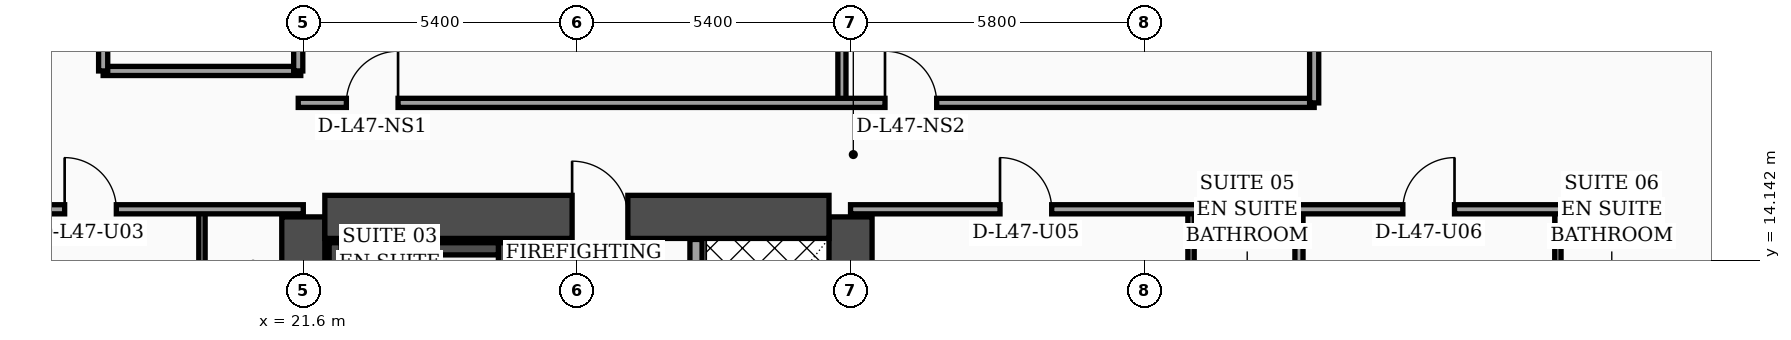
"""IFC4 building model, lengths in metres.
Left out: names, types, materials, properties, quantities, classifications, styles, units other than length and angle.
Written with IfcOpenShell. Run it as: python <this file> out.ifc"""

import sys

from ifc_helpers import new_model, si_unit, direction, frame, frame_2d, origin, place, context, subcontext, project, spatial, rectangle, extrude, element, fill, save


model = new_model("IFC4")
c1 = context("Model", 3, precision=1e-05, world=origin(), true_north=direction((0.0, 1.0)))
c2 = subcontext(c1, "Body", "Model", "MODEL_VIEW")
j1 = project(units=[si_unit("LENGTHUNIT", "METRE"), si_unit("PLANEANGLEUNIT", "RADIAN")], contexts=[c1])
p1 = place(None, origin())
s1 = spatial("IfcSite", under=j1, at=p1, CompositionType="ELEMENT")
p2 = place(p1, origin())
s2 = spatial("IfcBuilding", under=s1, at=p2, CompositionType="ELEMENT")
p3 = place(p2, frame((0.0, 0.0, 191.3)))
s3 = spatial("IfcBuildingStorey", under=s2, at=p3, CompositionType="ELEMENT", Elevation=191.3)
for number, where, z_axis, x_axis in (
    (1, (21.6, 4.6, 0.0), (0.0, 0.0, 1.0), (0.0, 1.0, 0.0)),
    (2, (32.4, 4.6, 0.0), (0.0, 0.0, 1.0), (0.0, 1.0, 0.0)),
):
    element("IfcWall", number, at=place(p3, frame(where, z_axis=z_axis, x_axis=x_axis)), inside=s3, PredefinedType="SHEAR", context=c2, shape_type="SweptSolid", body=[
        extrude(rectangle(XDim=10.4, YDim=0.85, at=frame_2d((5.2, 0.0))), origin(), (0.0, 0.0, 1.0), 3.56),
    ])
p4 = place(p3, frame((22.025, 15.0, 0.0), z_axis=(0.0, 0.0, 1.0), x_axis=(1.0, 0.0, 0.0)))
e3 = element("IfcWall", 3, at=p4, inside=s3, PredefinedType="SHEAR", context=c2, shape_type="SweptSolid", body=[
    extrude(rectangle(XDim=9.95, YDim=0.85, at=frame_2d((4.975, 0.0))), origin(), (0.0, 0.0, 1.0), 3.56),
])
p5 = place(p4, frame((4.88, 0.0, 0.0)))
e4 = element("IfcOpeningElement", 4, at=p5, cuts=e3, PredefinedType="OPENING", context=c2, shape_type="SweptSolid", body=[
    extrude(rectangle(XDim=1.1, YDim=2.2, at=frame_2d((0.55, 1.1))), frame((0.0, 0.435, 0.0), z_axis=(0.0, -1.0, 0.0), x_axis=(1.0, 0.0, 0.0)), (0.0, 0.0, 1.0), 0.87),
])
p6 = place(p3, frame((22.23, 5.025, 0.0), z_axis=(0.0, 0.0, 1.0), x_axis=(0.0, 1.0, 0.0)))
e5 = element("IfcWall", 5, at=p6, inside=s3, PredefinedType="SOLIDWALL", context=c2, shape_type="SweptSolid", body=[
    extrude(rectangle(XDim=9.465, YDim=0.24, at=frame_2d((4.732, 0.0))), origin(), (0.0, 0.0, 1.0), 3.56),
])
p7 = place(p3, frame((25.57, 5.025, 0.0), z_axis=(0.0, 0.0, 1.0), x_axis=(0.0, 1.0, 0.0)))
e6 = element("IfcWall", 6, at=p7, inside=s3, PredefinedType="SOLIDWALL", context=c2, shape_type="SweptSolid", body=[
    extrude(rectangle(XDim=9.465, YDim=0.24, at=frame_2d((4.732, 0.0))), origin(), (0.0, 0.0, 1.0), 3.56),
])
p8 = place(p7, frame((0.35, 0.0, 0.0)))
e7 = element("IfcOpeningElement", 7, at=p8, cuts=e6, PredefinedType="OPENING", context=c2, shape_type="SweptSolid", body=[
    extrude(rectangle(XDim=1.15, YDim=2.2, at=frame_2d((0.575, 1.1))), frame((0.0, 0.13, 0.0), z_axis=(0.0, -1.0, 0.0), x_axis=(1.0, 0.0, 0.0)), (0.0, 0.0, 1.0), 0.26),
])
p9 = place(p3, frame((22.35, 14.37, 0.0), z_axis=(0.0, 0.0, 1.0), x_axis=(1.0, 0.0, 0.0)))
e8 = element("IfcWall", 8, at=p9, inside=s3, PredefinedType="SOLIDWALL", context=c2, shape_type="SweptSolid", body=[
    extrude(rectangle(XDim=3.1, YDim=0.24, at=frame_2d((1.55, 0.0))), origin(), (0.0, 0.0, 1.0), 3.56),
])
p10 = place(p3, frame((55.03, 5.505, 0.0), z_axis=(0.0, 0.0, 1.0), x_axis=(-0.300509063924, 0.953778958931, 0.0)))
e9 = element("IfcWall", 9, at=p10, inside=s3, PredefinedType="SOLIDWALL", context=c2, shape_type="SweptSolid", body=[
    extrude(rectangle(XDim=30.814, YDim=0.32, at=frame_2d((15.407, 0.0))), origin(), (0.0, 0.0, 1.0), 3.56),
])
p11 = place(p10, frame((8.9, 0.0, 0.0)))
e10 = element("IfcOpeningElement", 10, at=p11, cuts=e9, PredefinedType="OPENING", context=c2, shape_type="SweptSolid", body=[
    extrude(rectangle(XDim=1.4, YDim=2.25, at=frame_2d((0.7, 1.125))), frame((0.0, 0.17, 0.0), z_axis=(0.0, -1.0, 0.0), x_axis=(1.0, 0.0, 0.0)), (0.0, 0.0, 1.0), 0.34),
])
p12 = place(p10, frame((4.437, 0.0, 0.7)))
e11 = element("IfcOpeningElement", 11, at=p12, cuts=e9, PredefinedType="OPENING", context=c2, shape_type="SweptSolid", body=[
    extrude(rectangle(XDim=1.6, YDim=1.65, at=frame_2d((0.8, 0.825))), frame((0.0, 0.17, 0.0), z_axis=(0.0, -1.0, 0.0), x_axis=(1.0, 0.0, 0.0)), (0.0, 0.0, 1.0), 0.34),
])
p13 = place(p10, frame((18.696, 0.0, 0.7)))
e12 = element("IfcOpeningElement", 12, at=p13, cuts=e9, PredefinedType="OPENING", context=c2, shape_type="SweptSolid", body=[
    extrude(rectangle(XDim=1.6, YDim=1.65, at=frame_2d((0.8, 0.825))), frame((0.0, 0.17, 0.0), z_axis=(0.0, -1.0, 0.0), x_axis=(1.0, 0.0, 0.0)), (0.0, 0.0, 1.0), 0.34),
])
p14 = place(p10, frame((1.6, 0.0, 0.75)))
e13 = element("IfcOpeningElement", 13, at=p14, cuts=e9, PredefinedType="OPENING", context=c2, shape_type="SweptSolid", body=[
    extrude(rectangle(XDim=1.5, YDim=1.6, at=frame_2d((0.75, 0.8))), frame((0.0, 0.17, 0.0), z_axis=(0.0, -1.0, 0.0), x_axis=(1.0, 0.0, 0.0)), (0.0, 0.0, 1.0), 0.34),
])
p15 = place(p10, frame((6.75, 0.0, 0.75)))
e14 = element("IfcOpeningElement", 14, at=p15, cuts=e9, PredefinedType="OPENING", context=c2, shape_type="SweptSolid", body=[
    extrude(rectangle(XDim=1.5, YDim=1.6, at=frame_2d((0.75, 0.8))), frame((0.0, 0.17, 0.0), z_axis=(0.0, -1.0, 0.0), x_axis=(1.0, 0.0, 0.0)), (0.0, 0.0, 1.0), 0.34),
])
p16 = place(p10, frame((10.9, 0.0, 0.75)))
e15 = element("IfcOpeningElement", 15, at=p16, cuts=e9, PredefinedType="OPENING", context=c2, shape_type="SweptSolid", body=[
    extrude(rectangle(XDim=1.5, YDim=1.6, at=frame_2d((0.75, 0.8))), frame((0.0, 0.17, 0.0), z_axis=(0.0, -1.0, 0.0), x_axis=(1.0, 0.0, 0.0)), (0.0, 0.0, 1.0), 0.34),
])
p17 = place(p10, frame((14.0, 0.0, 0.75)))
e16 = element("IfcOpeningElement", 16, at=p17, cuts=e9, PredefinedType="OPENING", context=c2, shape_type="SweptSolid", body=[
    extrude(rectangle(XDim=1.5, YDim=1.6, at=frame_2d((0.75, 0.8))), frame((0.0, 0.17, 0.0), z_axis=(0.0, -1.0, 0.0), x_axis=(1.0, 0.0, 0.0)), (0.0, 0.0, 1.0), 0.34),
])
p18 = place(p10, frame((16.55, 0.0, 0.75)))
e17 = element("IfcOpeningElement", 17, at=p18, cuts=e9, PredefinedType="OPENING", context=c2, shape_type="SweptSolid", body=[
    extrude(rectangle(XDim=1.5, YDim=1.6, at=frame_2d((0.75, 0.8))), frame((0.0, 0.17, 0.0), z_axis=(0.0, -1.0, 0.0), x_axis=(1.0, 0.0, 0.0)), (0.0, 0.0, 1.0), 0.34),
])
p19 = place(p10, frame((20.75, 0.0, 0.75)))
e18 = element("IfcOpeningElement", 18, at=p19, cuts=e9, PredefinedType="OPENING", context=c2, shape_type="SweptSolid", body=[
    extrude(rectangle(XDim=1.5, YDim=1.6, at=frame_2d((0.75, 0.8))), frame((0.0, 0.17, 0.0), z_axis=(0.0, -1.0, 0.0), x_axis=(1.0, 0.0, 0.0)), (0.0, 0.0, 1.0), 0.34),
])
p20 = place(p10, frame((23.3, 0.0, 0.75)))
e19 = element("IfcOpeningElement", 19, at=p20, cuts=e9, PredefinedType="OPENING", context=c2, shape_type="SweptSolid", body=[
    extrude(rectangle(XDim=1.5, YDim=1.6, at=frame_2d((0.75, 0.8))), frame((0.0, 0.17, 0.0), z_axis=(0.0, -1.0, 0.0), x_axis=(1.0, 0.0, 0.0)), (0.0, 0.0, 1.0), 0.34),
])
p21 = place(p10, frame((26.4, 0.0, 0.75)))
e20 = element("IfcOpeningElement", 20, at=p21, cuts=e9, PredefinedType="OPENING", context=c2, shape_type="SweptSolid", body=[
    extrude(rectangle(XDim=1.5, YDim=1.6, at=frame_2d((0.75, 0.8))), frame((0.0, 0.17, 0.0), z_axis=(0.0, -1.0, 0.0), x_axis=(1.0, 0.0, 0.0)), (0.0, 0.0, 1.0), 0.34),
])
p22 = place(p3, frame((29.35, 5.045, 0.0), z_axis=(0.0, 0.0, 1.0), x_axis=(0.0, 1.0, 0.0)))
e21 = element("IfcWall", 21, at=p22, inside=s3, PredefinedType="SOLIDWALL", context=c2, shape_type="SweptSolid", body=[
    extrude(rectangle(XDim=9.51, YDim=0.24, at=frame_2d((4.755, 0.0))), origin(), (0.0, 0.0, 1.0), 3.56),
])
p23 = place(p22, frame((0.55, 0.0, 0.0)))
e22 = element("IfcOpeningElement", 22, at=p23, cuts=e21, PredefinedType="OPENING", context=c2, shape_type="SweptSolid", body=[
    extrude(rectangle(XDim=1.3, YDim=2.35, at=frame_2d((0.65, 1.175))), frame((0.0, 0.13, 0.0), z_axis=(0.0, -1.0, 0.0), x_axis=(1.0, 0.0, 0.0)), (0.0, 0.0, 1.0), 0.26),
])
p24 = place(p3, frame((19.6, 2.44, 0.0), z_axis=(0.0, 0.0, 1.0), x_axis=(0.0, 1.0, 0.0)))
e23 = element("IfcWall", 23, at=p24, inside=s3, PredefinedType="PARTITIONING", context=c2, shape_type="SweptSolid", body=[
    extrude(rectangle(XDim=12.71, YDim=0.125, at=frame_2d((6.355, 0.0))), origin(), (0.0, 0.0, 1.0), 2.49),
])
p25 = place(p24, frame((4.34, 0.0, 0.0)))
e24 = element("IfcOpeningElement", 24, at=p25, cuts=e23, PredefinedType="OPENING", context=c2, shape_type="SweptSolid", body=[
    extrude(rectangle(XDim=0.96, YDim=2.2, at=frame_2d((0.48, 1.1))), frame((0.0, 0.073, 0.0), z_axis=(0.0, -1.0, 0.0), x_axis=(1.0, 0.0, 0.0)), (0.0, 0.0, 1.0), 0.145),
])
p26 = place(p24, frame((10.18, 0.0, 0.0)))
e25 = element("IfcOpeningElement", 25, at=p26, cuts=e23, PredefinedType="OPENING", context=c2, shape_type="SweptSolid", body=[
    extrude(rectangle(XDim=0.9, YDim=2.15, at=frame_2d((0.45, 1.075))), frame((0.0, 0.073, 0.0), z_axis=(0.0, -1.0, 0.0), x_axis=(1.0, 0.0, 0.0)), (0.0, 0.0, 1.0), 0.145),
])
p27 = place(p3, frame((15.15, 15.15, 0.0), z_axis=(0.0, 0.0, 1.0), x_axis=(1.0, 0.0, 0.0)))
e26 = element("IfcWall", 26, at=p27, inside=s3, PredefinedType="PARTITIONING", context=c2, shape_type="SweptSolid", body=[
    extrude(rectangle(XDim=6.45, YDim=0.18, at=frame_2d((3.225, 0.0))), origin(), (0.0, 0.0, 1.0), 2.49),
])
p28 = place(p27, frame((1.74, 0.0, 0.0)))
e27 = element("IfcOpeningElement", 27, at=p28, cuts=e26, PredefinedType="OPENING", context=c2, shape_type="SweptSolid", body=[
    extrude(rectangle(XDim=1.02, YDim=2.2, at=frame_2d((0.51, 1.1))), frame((0.0, 0.1, 0.0), z_axis=(0.0, -1.0, 0.0), x_axis=(1.0, 0.0, 0.0)), (0.0, 0.0, 1.0), 0.2),
])
p29 = place(p3, frame((17.65, 17.88, 0.0), z_axis=(0.0, 0.0, 1.0), x_axis=(1.0, 0.0, 0.0)))
e28 = element("IfcWall", 28, at=p29, inside=s3, PredefinedType="PARTITIONING", context=c2, shape_type="SweptSolid", body=[
    extrude(rectangle(XDim=3.9, YDim=0.18, at=frame_2d((1.95, 0.0))), origin(), (0.0, 0.0, 1.0), 3.56),
])
p30 = place(p3, frame((21.5, 17.88, 0.0), z_axis=(0.0, 0.0, 1.0), x_axis=(0.0, 1.0, 0.0)))
e29 = element("IfcWall", 29, at=p30, inside=s3, PredefinedType="PARTITIONING", context=c2, shape_type="SweptSolid", body=[
    extrude(rectangle(XDim=6.44, YDim=0.18, at=frame_2d((3.22, 0.0))), origin(), (0.0, 0.0, 1.0), 3.56),
])
p31 = place(p3, frame((17.65, 17.88, 0.0), z_axis=(0.0, 0.0, 1.0), x_axis=(0.0, 1.0, 0.0)))
e30 = element("IfcWall", 30, at=p31, inside=s3, PredefinedType="PARTITIONING", context=c2, shape_type="SweptSolid", body=[
    extrude(rectangle(XDim=6.44, YDim=0.18, at=frame_2d((3.22, 0.0))), origin(), (0.0, 0.0, 1.0), 3.56),
])
p32 = place(p31, frame((0.65, 0.0, 0.0)))
e31 = element("IfcOpeningElement", 31, at=p32, cuts=e30, PredefinedType="OPENING", context=c2, shape_type="SweptSolid", body=[
    extrude(rectangle(XDim=0.98, YDim=2.15, at=frame_2d((0.49, 1.075))), frame((0.0, 0.1, 0.0), z_axis=(0.0, -1.0, 0.0), x_axis=(1.0, 0.0, 0.0)), (0.0, 0.0, 1.0), 0.2),
])
p33 = place(p31, frame((3.97, 0.0, 0.0)))
e32 = element("IfcOpeningElement", 32, at=p33, cuts=e30, PredefinedType="OPENING", context=c2, shape_type="SweptSolid", body=[
    extrude(rectangle(XDim=0.96, YDim=2.2, at=frame_2d((0.48, 1.1))), frame((0.0, 0.1, 0.0), z_axis=(0.0, -1.0, 0.0), x_axis=(1.0, 0.0, 0.0)), (0.0, 0.0, 1.0), 0.2),
])
p34 = place(p3, frame((39.12, 2.44, 0.0), z_axis=(0.0, 0.0, 1.0), x_axis=(0.0, 1.0, 0.0)))
e33 = element("IfcWall", 33, at=p34, inside=s3, PredefinedType="PARTITIONING", context=c2, shape_type="SweptSolid", body=[
    extrude(rectangle(XDim=12.71, YDim=0.125, at=frame_2d((6.355, 0.0))), origin(), (0.0, 0.0, 1.0), 2.94),
])
p35 = place(p34, frame((4.35, 0.0, 0.0)))
e34 = element("IfcOpeningElement", 34, at=p35, cuts=e33, PredefinedType="OPENING", context=c2, shape_type="SweptSolid", body=[
    extrude(rectangle(XDim=0.96, YDim=2.2, at=frame_2d((0.48, 1.1))), frame((0.0, 0.073, 0.0), z_axis=(0.0, -1.0, 0.0), x_axis=(1.0, 0.0, 0.0)), (0.0, 0.0, 1.0), 0.145),
])
p36 = place(p34, frame((10.21, 0.0, 0.0)))
e35 = element("IfcOpeningElement", 35, at=p36, cuts=e33, PredefinedType="OPENING", context=c2, shape_type="SweptSolid", body=[
    extrude(rectangle(XDim=0.9, YDim=2.15, at=frame_2d((0.45, 1.075))), frame((0.0, 0.073, 0.0), z_axis=(0.0, -1.0, 0.0), x_axis=(1.0, 0.0, 0.0)), (0.0, 0.0, 1.0), 0.145),
])
p37 = place(p3, frame((46.36, 2.44, 0.0), z_axis=(0.0, 0.0, 1.0), x_axis=(0.0, 1.0, 0.0)))
e36 = element("IfcWall", 36, at=p37, inside=s3, PredefinedType="PARTITIONING", context=c2, shape_type="SweptSolid", body=[
    extrude(rectangle(XDim=12.71, YDim=0.125, at=frame_2d((6.355, 0.0))), origin(), (0.0, 0.0, 1.0), 3.09),
])
p38 = place(p37, frame((4.35, 0.0, 0.0)))
e37 = element("IfcOpeningElement", 37, at=p38, cuts=e36, PredefinedType="OPENING", context=c2, shape_type="SweptSolid", body=[
    extrude(rectangle(XDim=0.96, YDim=2.2, at=frame_2d((0.48, 1.1))), frame((0.0, 0.073, 0.0), z_axis=(0.0, -1.0, 0.0), x_axis=(1.0, 0.0, 0.0)), (0.0, 0.0, 1.0), 0.145),
])
p39 = place(p37, frame((10.21, 0.0, 0.0)))
e38 = element("IfcOpeningElement", 38, at=p39, cuts=e36, PredefinedType="OPENING", context=c2, shape_type="SweptSolid", body=[
    extrude(rectangle(XDim=0.9, YDim=2.15, at=frame_2d((0.45, 1.075))), frame((0.0, 0.073, 0.0), z_axis=(0.0, -1.0, 0.0), x_axis=(1.0, 0.0, 0.0)), (0.0, 0.0, 1.0), 0.145),
])
p40 = place(p3, frame((41.25, 2.44, 0.0), z_axis=(0.0, 0.0, 1.0), x_axis=(0.0, 1.0, 0.0)))
e39 = element("IfcWall", 39, at=p40, inside=s3, PredefinedType="PARTITIONING", context=c2, shape_type="SweptSolid", body=[
    extrude(rectangle(XDim=12.71, YDim=0.16, at=frame_2d((6.355, 0.0))), origin(), (0.0, 0.0, 1.0), 3.09),
])
p41 = place(p3, frame((32.4, 15.15, 0.0), z_axis=(0.0, 0.0, 1.0), x_axis=(1.0, 0.0, 0.0)))
e40 = element("IfcWall", 40, at=p41, inside=s3, PredefinedType="PARTITIONING", context=c2, shape_type="SweptSolid", body=[
    extrude(rectangle(XDim=16.0, YDim=0.18, at=frame_2d((8.0, 0.0))), origin(), (0.0, 0.0, 1.0), 2.94),
])
p42 = place(p41, frame((2.95, 0.0, 0.0)))
e41 = element("IfcOpeningElement", 41, at=p42, cuts=e40, PredefinedType="OPENING", context=c2, shape_type="SweptSolid", body=[
    extrude(rectangle(XDim=1.02, YDim=2.2, at=frame_2d((0.51, 1.1))), frame((0.0, 0.1, 0.0), z_axis=(0.0, -1.0, 0.0), x_axis=(1.0, 0.0, 0.0)), (0.0, 0.0, 1.0), 0.2),
])
p43 = place(p41, frame((10.9, 0.0, 0.0)))
e42 = element("IfcOpeningElement", 42, at=p43, cuts=e40, PredefinedType="OPENING", context=c2, shape_type="SweptSolid", body=[
    extrude(rectangle(XDim=1.02, YDim=2.2, at=frame_2d((0.51, 1.1))), frame((0.0, 0.1, 0.0), z_axis=(0.0, -1.0, 0.0), x_axis=(1.0, 0.0, 0.0)), (0.0, 0.0, 1.0), 0.2),
])
p44 = place(p3, frame((32.23, 17.25, 0.0), z_axis=(0.0, 0.0, 1.0), x_axis=(0.0, 1.0, 0.0)))
e43 = element("IfcWall", 43, at=p44, inside=s3, PredefinedType="PARTITIONING", context=c2, shape_type="SweptSolid", body=[
    extrude(rectangle(XDim=14.39, YDim=0.16, at=frame_2d((7.195, 0.0))), origin(), (0.0, 0.0, 1.0), 2.94),
])
p45 = place(p3, frame((21.5, 17.25, 0.0), z_axis=(0.0, 0.0, 1.0), x_axis=(1.0, 0.0, 0.0)))
e44 = element("IfcWall", 44, at=p45, inside=s3, PredefinedType="PARTITIONING", context=c2, shape_type="SweptSolid", body=[
    extrude(rectangle(XDim=20.05, YDim=0.18, at=frame_2d((10.025, 0.0))), origin(), (0.0, 0.0, 1.0), 2.94),
])
p46 = place(p45, frame((0.95, 0.0, 0.0)))
e45 = element("IfcOpeningElement", 45, at=p46, cuts=e44, PredefinedType="OPENING", context=c2, shape_type="SweptSolid", body=[
    extrude(rectangle(XDim=1.02, YDim=2.2, at=frame_2d((0.51, 1.1))), frame((0.0, 0.1, 0.0), z_axis=(0.0, -1.0, 0.0), x_axis=(1.0, 0.0, 0.0)), (0.0, 0.0, 1.0), 0.2),
])
p47 = place(p45, frame((11.58, 0.0, 0.0)))
e46 = element("IfcOpeningElement", 46, at=p47, cuts=e44, PredefinedType="OPENING", context=c2, shape_type="SweptSolid", body=[
    extrude(rectangle(XDim=1.02, YDim=2.2, at=frame_2d((0.51, 1.1))), frame((0.0, 0.1, 0.0), z_axis=(0.0, -1.0, 0.0), x_axis=(1.0, 0.0, 0.0)), (0.0, 0.0, 1.0), 0.2),
])
p48 = place(p3, frame((41.55, 17.25, 0.0), z_axis=(0.0, 0.0, 1.0), x_axis=(0.0, 1.0, 0.0)))
e47 = element("IfcWall", 47, at=p48, inside=s3, PredefinedType="PARTITIONING", context=c2, shape_type="SweptSolid", body=[
    extrude(rectangle(XDim=20.66, YDim=0.18, at=frame_2d((10.33, 0.0))), origin(), (0.0, 0.0, 1.0), 2.94),
])
p49 = place(p28, origin())
e48 = element("IfcDoor", 48, at=p49, inside=s3, OperationType="SINGLE_SWING_LEFT", PredefinedType="DOOR", context=c2, shape_type="SweptSolid", body=[
    extrude(rectangle(XDim=1.02, YDim=2.2, at=frame_2d((0.51, 1.1))), frame((0.0, 0.025, 0.0), z_axis=(0.0, -1.0, 0.0), x_axis=(1.0, 0.0, 0.0)), (0.0, 0.0, 1.0), 0.05),
])
fill(e27, e48)
p50 = place(p42, origin())
e49 = element("IfcDoor", 49, at=p50, inside=s3, OperationType="SINGLE_SWING_LEFT", PredefinedType="DOOR", context=c2, shape_type="SweptSolid", body=[
    extrude(rectangle(XDim=1.02, YDim=2.2, at=frame_2d((0.51, 1.1))), frame((0.0, 0.025, 0.0), z_axis=(0.0, -1.0, 0.0), x_axis=(1.0, 0.0, 0.0)), (0.0, 0.0, 1.0), 0.05),
])
fill(e41, e49)
p51 = place(p43, origin())
e50 = element("IfcDoor", 50, at=p51, inside=s3, OperationType="SINGLE_SWING_RIGHT", PredefinedType="DOOR", context=c2, shape_type="SweptSolid", body=[
    extrude(rectangle(XDim=1.02, YDim=2.2, at=frame_2d((0.51, 1.1))), frame((0.0, 0.025, 0.0), z_axis=(0.0, -1.0, 0.0), x_axis=(1.0, 0.0, 0.0)), (0.0, 0.0, 1.0), 0.05),
])
fill(e42, e50)
p52 = place(p46, origin())
e51 = element("IfcDoor", 51, at=p52, inside=s3, OperationType="SINGLE_SWING_RIGHT", PredefinedType="DOOR", context=c2, shape_type="SweptSolid", body=[
    extrude(rectangle(XDim=1.02, YDim=2.2, at=frame_2d((0.51, 1.1))), frame((0.0, 0.025, 0.0), z_axis=(0.0, -1.0, 0.0), x_axis=(1.0, 0.0, 0.0)), (0.0, 0.0, 1.0), 0.05),
])
fill(e45, e51)
p53 = place(p47, origin())
e52 = element("IfcDoor", 52, at=p53, inside=s3, OperationType="SINGLE_SWING_LEFT", PredefinedType="DOOR", context=c2, shape_type="SweptSolid", body=[
    extrude(rectangle(XDim=1.02, YDim=2.2, at=frame_2d((0.51, 1.1))), frame((0.0, 0.025, 0.0), z_axis=(0.0, -1.0, 0.0), x_axis=(1.0, 0.0, 0.0)), (0.0, 0.0, 1.0), 0.05),
])
fill(e46, e52)
p54 = place(p5, origin())
e53 = element("IfcDoor", 53, at=p54, inside=s3, OperationType="SINGLE_SWING_LEFT", PredefinedType="DOOR", context=c2, shape_type="SweptSolid", body=[
    extrude(rectangle(XDim=1.1, YDim=2.2, at=frame_2d((0.55, 1.1))), frame((0.0, 0.025, 0.0), z_axis=(0.0, -1.0, 0.0), x_axis=(1.0, 0.0, 0.0)), (0.0, 0.0, 1.0), 0.05),
])
fill(e4, e53)
save(model, sys.argv[1])
